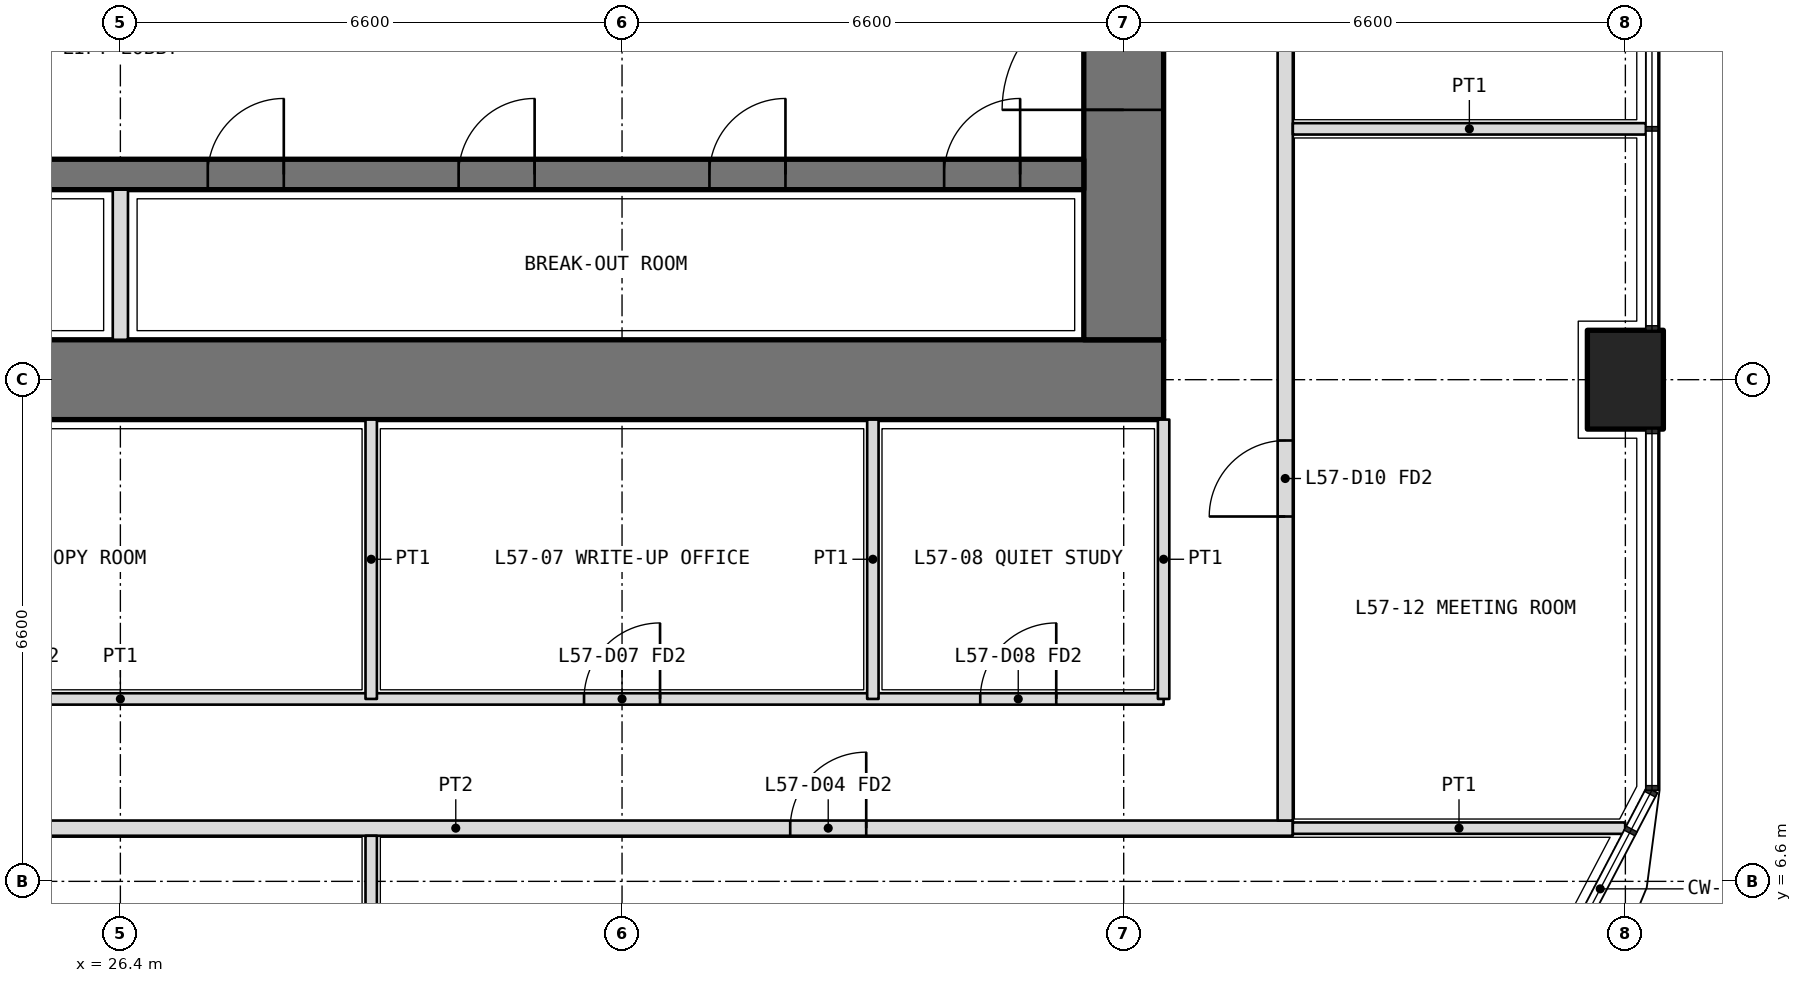
"""IFC4 building model, lengths in metres.
Left out: names, types, materials, properties, quantities, classifications, styles, units other than length and angle.
Written with IfcOpenShell. Run it as: python <this file> out.ifc"""

import sys

from ifc_helpers import new_model, si_unit, direction, frame, frame_2d, origin, origin_2d, place, context, subcontext, project, spatial, rectangle, extrude, element, fill, save


model = new_model("IFC4")
c1 = context("Model", 3, precision=1e-05, world=origin(), true_north=direction((0.0, 1.0)))
c2 = subcontext(c1, "Body", "Model", "MODEL_VIEW")
j1 = project(units=[si_unit("LENGTHUNIT", "METRE"), si_unit("PLANEANGLEUNIT", "RADIAN")], contexts=[c1])
p1 = place(None, origin())
s1 = spatial("IfcSite", under=j1, at=p1, CompositionType="ELEMENT")
p2 = place(p1, origin())
s2 = spatial("IfcBuilding", under=s1, at=p2, CompositionType="ELEMENT")
p3 = place(p2, frame((0.0, 0.0, 250.2)))
s3 = spatial("IfcBuildingStorey", under=s2, at=p3, CompositionType="ELEMENT", Elevation=250.2)
p4 = place(p3, frame((46.2, 13.2, 0.0), z_axis=(0.0, 0.0, 1.0), x_axis=(0.0, 1.0, 0.0)))
e1 = element("IfcColumn", 1, at=p4, inside=s3, PredefinedType="COLUMN", context=c2, shape_type="SweptSolid", body=[
    extrude(rectangle(XDim=1.3, YDim=1.0, at=origin_2d()), origin(), (0.0, 0.0, 1.0), 4.2),
])
p5 = place(p3, frame((12.675, 13.2, 0.0), z_axis=(0.0, 0.0, 1.0), x_axis=(1.0, 0.0, 0.0)))
e2 = element("IfcWall", 2, at=p5, inside=s3, PredefinedType="SHEAR", context=c2, shape_type="SweptSolid", body=[
    extrude(rectangle(XDim=27.45, YDim=1.05, at=frame_2d((13.725, 0.0))), origin(), (0.0, 0.0, 1.0), 4.2),
])
p6 = place(p3, frame((39.6, 13.725, 0.0), z_axis=(0.0, 0.0, 1.0), x_axis=(0.0, 1.0, 0.0)))
e3 = element("IfcWall", 3, at=p6, inside=s3, PredefinedType="SHEAR", context=c2, shape_type="SweptSolid", body=[
    extrude(rectangle(XDim=18.75, YDim=1.05, at=frame_2d((9.375, 0.0))), origin(), (0.0, 0.0, 1.0), 4.2),
])
p7 = place(p6, frame((3.025, 0.0, 0.0)))
e4 = element("IfcOpeningElement", 4, at=p7, cuts=e3, PredefinedType="OPENING", context=c2, shape_type="SweptSolid", body=[
    extrude(rectangle(XDim=1.6, YDim=2.1, at=frame_2d((0.8, 1.05))), frame((0.0, 0.535, 0.0), z_axis=(0.0, -1.0, 0.0), x_axis=(1.0, 0.0, 0.0)), (0.0, 0.0, 1.0), 1.07),
])
p8 = place(p6, frame((13.825, 0.0, 0.0)))
e5 = element("IfcOpeningElement", 5, at=p8, cuts=e3, PredefinedType="OPENING", context=c2, shape_type="SweptSolid", body=[
    extrude(rectangle(XDim=1.6, YDim=2.1, at=frame_2d((0.8, 1.05))), frame((0.0, 0.535, 0.0), z_axis=(0.0, -1.0, 0.0), x_axis=(1.0, 0.0, 0.0)), (0.0, 0.0, 1.0), 1.07),
])
p9 = place(p3, frame((13.725, 15.9, 0.0), z_axis=(0.0, 0.0, 1.0), x_axis=(1.0, 0.0, 0.0)))
e6 = element("IfcWall", 6, at=p9, inside=s3, PredefinedType="SHEAR", context=c2, shape_type="SweptSolid", body=[
    extrude(rectangle(XDim=25.35, YDim=0.4, at=frame_2d((12.675, 0.0))), origin(), (0.0, 0.0, 1.0), 4.2),
])
p10 = place(p9, frame((0.837, 0.0, 0.0)))
e7 = element("IfcOpeningElement", 7, at=p10, cuts=e6, PredefinedType="OPENING", context=c2, shape_type="SweptSolid", body=[
    extrude(rectangle(XDim=1.0, YDim=2.1, at=frame_2d((0.5, 1.05))), frame((0.0, 0.21, 0.0), z_axis=(0.0, -1.0, 0.0), x_axis=(1.0, 0.0, 0.0)), (0.0, 0.0, 1.0), 0.42),
])
p11 = place(p9, frame((3.925, 0.0, 0.0)))
e8 = element("IfcOpeningElement", 8, at=p11, cuts=e6, PredefinedType="OPENING", context=c2, shape_type="SweptSolid", body=[
    extrude(rectangle(XDim=1.0, YDim=2.1, at=frame_2d((0.5, 1.05))), frame((0.0, 0.21, 0.0), z_axis=(0.0, -1.0, 0.0), x_axis=(1.0, 0.0, 0.0)), (0.0, 0.0, 1.0), 0.42),
])
p12 = place(p9, frame((7.225, 0.0, 0.0)))
e9 = element("IfcOpeningElement", 9, at=p12, cuts=e6, PredefinedType="OPENING", context=c2, shape_type="SweptSolid", body=[
    extrude(rectangle(XDim=1.0, YDim=2.1, at=frame_2d((0.5, 1.05))), frame((0.0, 0.21, 0.0), z_axis=(0.0, -1.0, 0.0), x_axis=(1.0, 0.0, 0.0)), (0.0, 0.0, 1.0), 0.42),
])
p13 = place(p9, frame((10.525, 0.0, 0.0)))
e10 = element("IfcOpeningElement", 10, at=p13, cuts=e6, PredefinedType="OPENING", context=c2, shape_type="SweptSolid", body=[
    extrude(rectangle(XDim=1.0, YDim=2.1, at=frame_2d((0.5, 1.05))), frame((0.0, 0.21, 0.0), z_axis=(0.0, -1.0, 0.0), x_axis=(1.0, 0.0, 0.0)), (0.0, 0.0, 1.0), 0.42),
])
p14 = place(p9, frame((13.825, 0.0, 0.0)))
e11 = element("IfcOpeningElement", 11, at=p14, cuts=e6, PredefinedType="OPENING", context=c2, shape_type="SweptSolid", body=[
    extrude(rectangle(XDim=1.0, YDim=2.1, at=frame_2d((0.5, 1.05))), frame((0.0, 0.21, 0.0), z_axis=(0.0, -1.0, 0.0), x_axis=(1.0, 0.0, 0.0)), (0.0, 0.0, 1.0), 0.42),
])
p15 = place(p9, frame((17.125, 0.0, 0.0)))
e12 = element("IfcOpeningElement", 12, at=p15, cuts=e6, PredefinedType="OPENING", context=c2, shape_type="SweptSolid", body=[
    extrude(rectangle(XDim=1.0, YDim=2.1, at=frame_2d((0.5, 1.05))), frame((0.0, 0.21, 0.0), z_axis=(0.0, -1.0, 0.0), x_axis=(1.0, 0.0, 0.0)), (0.0, 0.0, 1.0), 0.42),
])
p16 = place(p9, frame((20.425, 0.0, 0.0)))
e13 = element("IfcOpeningElement", 13, at=p16, cuts=e6, PredefinedType="OPENING", context=c2, shape_type="SweptSolid", body=[
    extrude(rectangle(XDim=1.0, YDim=2.1, at=frame_2d((0.5, 1.05))), frame((0.0, 0.21, 0.0), z_axis=(0.0, -1.0, 0.0), x_axis=(1.0, 0.0, 0.0)), (0.0, 0.0, 1.0), 0.42),
])
p17 = place(p9, frame((23.512, 0.0, 0.0)))
e14 = element("IfcOpeningElement", 14, at=p17, cuts=e6, PredefinedType="OPENING", context=c2, shape_type="SweptSolid", body=[
    extrude(rectangle(XDim=1.0, YDim=2.1, at=frame_2d((0.5, 1.05))), frame((0.0, 0.21, 0.0), z_axis=(0.0, -1.0, 0.0), x_axis=(1.0, 0.0, 0.0)), (0.0, 0.0, 1.0), 0.42),
])
p18 = place(p3, frame((26.4, 13.725, 0.0), z_axis=(0.0, 0.0, 1.0), x_axis=(0.0, 1.0, 0.0)))
e15 = element("IfcWall", 15, at=p18, inside=s3, PredefinedType="PARTITIONING", context=c2, shape_type="SweptSolid", body=[
    extrude(rectangle(XDim=1.975, YDim=0.2, at=frame_2d((0.987, 0.0))), origin(), (0.0, 0.0, 1.0), 4.2),
])
p19 = place(p3, frame((12.675, 9.0, 0.0), z_axis=(0.0, 0.0, 1.0), x_axis=(1.0, 0.0, 0.0)))
e16 = element("IfcWall", 16, at=p19, inside=s3, PredefinedType="PARTITIONING", context=c2, shape_type="SweptSolid", body=[
    extrude(rectangle(XDim=27.45, YDim=0.15, at=frame_2d((13.725, 0.0))), origin(), (0.0, 0.0, 1.0), 3.0),
])
p20 = place(p19, frame((3.062, 0.0, 0.0)))
e17 = element("IfcOpeningElement", 17, at=p20, cuts=e16, PredefinedType="OPENING", context=c2, shape_type="SweptSolid", body=[
    extrude(rectangle(XDim=1.0, YDim=2.1, at=frame_2d((0.5, 1.05))), frame((0.0, 0.085, 0.0), z_axis=(0.0, -1.0, 0.0), x_axis=(1.0, 0.0, 0.0)), (0.0, 0.0, 1.0), 0.17),
])
p21 = place(p19, frame((11.575, 0.0, 0.0)))
e18 = element("IfcOpeningElement", 18, at=p21, cuts=e16, PredefinedType="OPENING", context=c2, shape_type="SweptSolid", body=[
    extrude(rectangle(XDim=1.0, YDim=2.1, at=frame_2d((0.5, 1.05))), frame((0.0, 0.085, 0.0), z_axis=(0.0, -1.0, 0.0), x_axis=(1.0, 0.0, 0.0)), (0.0, 0.0, 1.0), 0.17),
])
p22 = place(p19, frame((19.825, 0.0, 0.0)))
e19 = element("IfcOpeningElement", 19, at=p22, cuts=e16, PredefinedType="OPENING", context=c2, shape_type="SweptSolid", body=[
    extrude(rectangle(XDim=1.0, YDim=2.1, at=frame_2d((0.5, 1.05))), frame((0.0, 0.085, 0.0), z_axis=(0.0, -1.0, 0.0), x_axis=(1.0, 0.0, 0.0)), (0.0, 0.0, 1.0), 0.17),
])
p23 = place(p19, frame((25.038, 0.0, 0.0)))
e20 = element("IfcOpeningElement", 20, at=p23, cuts=e16, PredefinedType="OPENING", context=c2, shape_type="SweptSolid", body=[
    extrude(rectangle(XDim=1.0, YDim=2.1, at=frame_2d((0.5, 1.05))), frame((0.0, 0.085, 0.0), z_axis=(0.0, -1.0, 0.0), x_axis=(1.0, 0.0, 0.0)), (0.0, 0.0, 1.0), 0.17),
])
p24 = place(p3, frame((40.125, 12.675, 0.0), z_axis=(0.0, 0.0, 1.0), x_axis=(0.0, -1.0, 0.0)))
e21 = element("IfcWall", 21, at=p24, inside=s3, PredefinedType="PARTITIONING", context=c2, shape_type="SweptSolid", body=[
    extrude(rectangle(XDim=3.675, YDim=0.15, at=frame_2d((1.837, 0.0))), origin(), (0.0, 0.0, 1.0), 3.0),
])
for number, where, z_axis, x_axis in (
    (22, (29.7, 12.675, 0.0), (0.0, 0.0, 1.0), (0.0, -1.0, 0.0)),
    (23, (36.3, 12.675, 0.0), (0.0, 0.0, 1.0), (0.0, -1.0, 0.0)),
):
    element("IfcWall", number, at=place(p3, frame(where, z_axis=z_axis, x_axis=x_axis)), inside=s3, PredefinedType="PARTITIONING", context=c2, shape_type="SweptSolid", body=[
        extrude(rectangle(XDim=3.675, YDim=0.15, at=frame_2d((1.837, 0.0))), origin(), (0.0, 0.0, 1.0), 3.9),
    ])
p25 = place(p3, frame((19.8, 7.3, 0.0), z_axis=(0.0, 0.0, 1.0), x_axis=(1.0, 0.0, 0.0)))
e24 = element("IfcWall", 24, at=p25, inside=s3, PredefinedType="PARTITIONING", context=c2, shape_type="SweptSolid", body=[
    extrude(rectangle(XDim=22.025, YDim=0.2, at=frame_2d((11.012, 0.0))), origin(), (0.0, 0.0, 1.0), 3.0),
])
p26 = place(p25, frame((4.35, 0.0, 0.0)))
e25 = element("IfcOpeningElement", 25, at=p26, cuts=e24, PredefinedType="OPENING", context=c2, shape_type="SweptSolid", body=[
    extrude(rectangle(XDim=1.2, YDim=2.1, at=frame_2d((0.6, 1.05))), frame((0.0, 0.11, 0.0), z_axis=(0.0, -1.0, 0.0), x_axis=(1.0, 0.0, 0.0)), (0.0, 0.0, 1.0), 0.22),
])
p27 = place(p25, frame((15.413, 0.0, 0.0)))
e26 = element("IfcOpeningElement", 26, at=p27, cuts=e24, PredefinedType="OPENING", context=c2, shape_type="SweptSolid", body=[
    extrude(rectangle(XDim=1.0, YDim=2.1, at=frame_2d((0.5, 1.05))), frame((0.0, 0.11, 0.0), z_axis=(0.0, -1.0, 0.0), x_axis=(1.0, 0.0, 0.0)), (0.0, 0.0, 1.0), 0.22),
])
p28 = place(p3, frame((41.725, 7.4, 0.0), z_axis=(0.0, 0.0, 1.0), x_axis=(0.0, 1.0, 0.0)))
e27 = element("IfcWall", 27, at=p28, inside=s3, PredefinedType="PARTITIONING", context=c2, shape_type="SweptSolid", body=[
    extrude(rectangle(XDim=31.4, YDim=0.2, at=frame_2d((15.7, 0.0))), origin(), (0.0, 0.0, 1.0), 3.0),
])
p29 = place(p28, frame((4.0, 0.0, 0.0)))
e28 = element("IfcOpeningElement", 28, at=p29, cuts=e27, PredefinedType="OPENING", context=c2, shape_type="SweptSolid", body=[
    extrude(rectangle(XDim=1.0, YDim=2.1, at=frame_2d((0.5, 1.05))), frame((0.0, 0.11, 0.0), z_axis=(0.0, -1.0, 0.0), x_axis=(1.0, 0.0, 0.0)), (0.0, 0.0, 1.0), 0.22),
])
p30 = place(p28, frame((10.25, 0.0, 0.0)))
e29 = element("IfcOpeningElement", 29, at=p30, cuts=e27, PredefinedType="OPENING", context=c2, shape_type="SweptSolid", body=[
    extrude(rectangle(XDim=1.0, YDim=2.1, at=frame_2d((0.5, 1.05))), frame((0.0, 0.11, 0.0), z_axis=(0.0, -1.0, 0.0), x_axis=(1.0, 0.0, 0.0)), (0.0, 0.0, 1.0), 0.22),
])
p31 = place(p28, frame((13.4, 0.0, 0.0)))
e30 = element("IfcOpeningElement", 30, at=p31, cuts=e27, PredefinedType="OPENING", context=c2, shape_type="SweptSolid", body=[
    extrude(rectangle(XDim=1.0, YDim=2.1, at=frame_2d((0.5, 1.05))), frame((0.0, 0.11, 0.0), z_axis=(0.0, -1.0, 0.0), x_axis=(1.0, 0.0, 0.0)), (0.0, 0.0, 1.0), 0.22),
])
p32 = place(p28, frame((16.75, 0.0, 0.0)))
e31 = element("IfcOpeningElement", 31, at=p32, cuts=e27, PredefinedType="OPENING", context=c2, shape_type="SweptSolid", body=[
    extrude(rectangle(XDim=0.9, YDim=2.1, at=frame_2d((0.45, 1.05))), frame((0.0, 0.11, 0.0), z_axis=(0.0, -1.0, 0.0), x_axis=(1.0, 0.0, 0.0)), (0.0, 0.0, 1.0), 0.22),
])
p33 = place(p28, frame((20.05, 0.0, 0.0)))
e32 = element("IfcOpeningElement", 32, at=p33, cuts=e27, PredefinedType="OPENING", context=c2, shape_type="SweptSolid", body=[
    extrude(rectangle(XDim=1.2, YDim=2.1, at=frame_2d((0.6, 1.05))), frame((0.0, 0.11, 0.0), z_axis=(0.0, -1.0, 0.0), x_axis=(1.0, 0.0, 0.0)), (0.0, 0.0, 1.0), 0.22),
])
p34 = place(p28, frame((26.3, 0.0, 0.0)))
e33 = element("IfcOpeningElement", 33, at=p34, cuts=e27, PredefinedType="OPENING", context=c2, shape_type="SweptSolid", body=[
    extrude(rectangle(XDim=1.2, YDim=2.1, at=frame_2d((0.6, 1.05))), frame((0.0, 0.11, 0.0), z_axis=(0.0, -1.0, 0.0), x_axis=(1.0, 0.0, 0.0)), (0.0, 0.0, 1.0), 0.22),
])
p35 = place(p3, frame((46.198, 7.3, 0.0), z_axis=(0.0, 0.0, 1.0), x_axis=(-1.0, 0.0, 0.0)))
e34 = element("IfcWall", 34, at=p35, inside=s3, PredefinedType="PARTITIONING", context=c2, shape_type="SweptSolid", body=[
    extrude(rectangle(XDim=4.373, YDim=0.15, at=frame_2d((2.186, 0.0))), origin(), (0.0, 0.0, 1.0), 2.7),
])
p36 = place(p3, frame((29.7, 3.03, 0.0), z_axis=(0.0, 0.0, 1.0), x_axis=(0.0, 1.0, 0.0)))
e35 = element("IfcWall", 35, at=p36, inside=s3, PredefinedType="PARTITIONING", context=c2, shape_type="SweptSolid", body=[
    extrude(rectangle(XDim=4.17, YDim=0.15, at=frame_2d((2.085, 0.0))), origin(), (0.0, 0.0, 1.0), 2.7),
])
p37 = place(p3, frame((46.47, 16.5, 0.0), z_axis=(0.0, 0.0, 1.0), x_axis=(-1.0, 0.0, 0.0)))
e36 = element("IfcWall", 36, at=p37, inside=s3, PredefinedType="PARTITIONING", context=c2, shape_type="SweptSolid", body=[
    extrude(rectangle(XDim=4.645, YDim=0.15, at=frame_2d((2.323, 0.0))), origin(), (0.0, 0.0, 1.0), 2.7),
])
p38 = place(p22, origin())
e37 = element("IfcDoor", 37, at=p38, inside=s3, OperationType="SINGLE_SWING_RIGHT", PredefinedType="DOOR", context=c2, shape_type="SweptSolid", body=[
    extrude(rectangle(XDim=1.0, YDim=2.1, at=frame_2d((0.5, 1.05))), frame((0.0, 0.025, 0.0), z_axis=(0.0, -1.0, 0.0), x_axis=(1.0, 0.0, 0.0)), (0.0, 0.0, 1.0), 0.05),
])
fill(e19, e37)
p39 = place(p23, origin())
e38 = element("IfcDoor", 38, at=p39, inside=s3, OperationType="SINGLE_SWING_RIGHT", PredefinedType="DOOR", context=c2, shape_type="SweptSolid", body=[
    extrude(rectangle(XDim=1.0, YDim=2.1, at=frame_2d((0.5, 1.05))), frame((0.0, 0.025, 0.0), z_axis=(0.0, -1.0, 0.0), x_axis=(1.0, 0.0, 0.0)), (0.0, 0.0, 1.0), 0.05),
])
fill(e20, e38)
p40 = place(p27, origin())
e39 = element("IfcDoor", 39, at=p40, inside=s3, OperationType="SINGLE_SWING_RIGHT", PredefinedType="DOOR", context=c2, shape_type="SweptSolid", body=[
    extrude(rectangle(XDim=1.0, YDim=2.1, at=frame_2d((0.5, 1.05))), frame((0.0, 0.025, 0.0), z_axis=(0.0, -1.0, 0.0), x_axis=(1.0, 0.0, 0.0)), (0.0, 0.0, 1.0), 0.05),
])
fill(e26, e39)
p41 = place(p29, origin())
e40 = element("IfcDoor", 40, at=p41, inside=s3, OperationType="SINGLE_SWING_LEFT", PredefinedType="DOOR", context=c2, shape_type="SweptSolid", body=[
    extrude(rectangle(XDim=1.0, YDim=2.1, at=frame_2d((0.5, 1.05))), frame((0.0, 0.025, 0.0), z_axis=(0.0, -1.0, 0.0), x_axis=(1.0, 0.0, 0.0)), (0.0, 0.0, 1.0), 0.05),
])
fill(e28, e40)
p42 = place(p14, origin())
e41 = element("IfcDoor", 41, at=p42, inside=s3, OperationType="SINGLE_SWING_RIGHT", PredefinedType="DOOR", context=c2, shape_type="SweptSolid", body=[
    extrude(rectangle(XDim=1.0, YDim=2.1, at=frame_2d((0.5, 1.05))), frame((0.0, 0.025, 0.0), z_axis=(0.0, -1.0, 0.0), x_axis=(1.0, 0.0, 0.0)), (0.0, 0.0, 1.0), 0.05),
])
fill(e11, e41)
p43 = place(p15, origin())
e42 = element("IfcDoor", 42, at=p43, inside=s3, OperationType="SINGLE_SWING_RIGHT", PredefinedType="DOOR", context=c2, shape_type="SweptSolid", body=[
    extrude(rectangle(XDim=1.0, YDim=2.1, at=frame_2d((0.5, 1.05))), frame((0.0, 0.025, 0.0), z_axis=(0.0, -1.0, 0.0), x_axis=(1.0, 0.0, 0.0)), (0.0, 0.0, 1.0), 0.05),
])
fill(e12, e42)
p44 = place(p16, origin())
e43 = element("IfcDoor", 43, at=p44, inside=s3, OperationType="SINGLE_SWING_RIGHT", PredefinedType="DOOR", context=c2, shape_type="SweptSolid", body=[
    extrude(rectangle(XDim=1.0, YDim=2.1, at=frame_2d((0.5, 1.05))), frame((0.0, 0.025, 0.0), z_axis=(0.0, -1.0, 0.0), x_axis=(1.0, 0.0, 0.0)), (0.0, 0.0, 1.0), 0.05),
])
fill(e13, e43)
p45 = place(p17, origin())
e44 = element("IfcDoor", 44, at=p45, inside=s3, OperationType="SINGLE_SWING_RIGHT", PredefinedType="DOOR", context=c2, shape_type="SweptSolid", body=[
    extrude(rectangle(XDim=1.0, YDim=2.1, at=frame_2d((0.5, 1.05))), frame((0.0, 0.025, 0.0), z_axis=(0.0, -1.0, 0.0), x_axis=(1.0, 0.0, 0.0)), (0.0, 0.0, 1.0), 0.05),
])
fill(e14, e44)
p46 = place(p7, origin())
e45 = element("IfcDoor", 45, at=p46, inside=s3, OperationType="DOUBLE_DOOR_DOUBLE_SWING", PredefinedType="DOOR", context=c2, shape_type="SweptSolid", body=[
    extrude(rectangle(XDim=1.6, YDim=2.1, at=frame_2d((0.8, 1.05))), frame((0.0, 0.025, 0.0), z_axis=(0.0, -1.0, 0.0), x_axis=(1.0, 0.0, 0.0)), (0.0, 0.0, 1.0), 0.05),
])
fill(e4, e45)
save(model, sys.argv[1])
